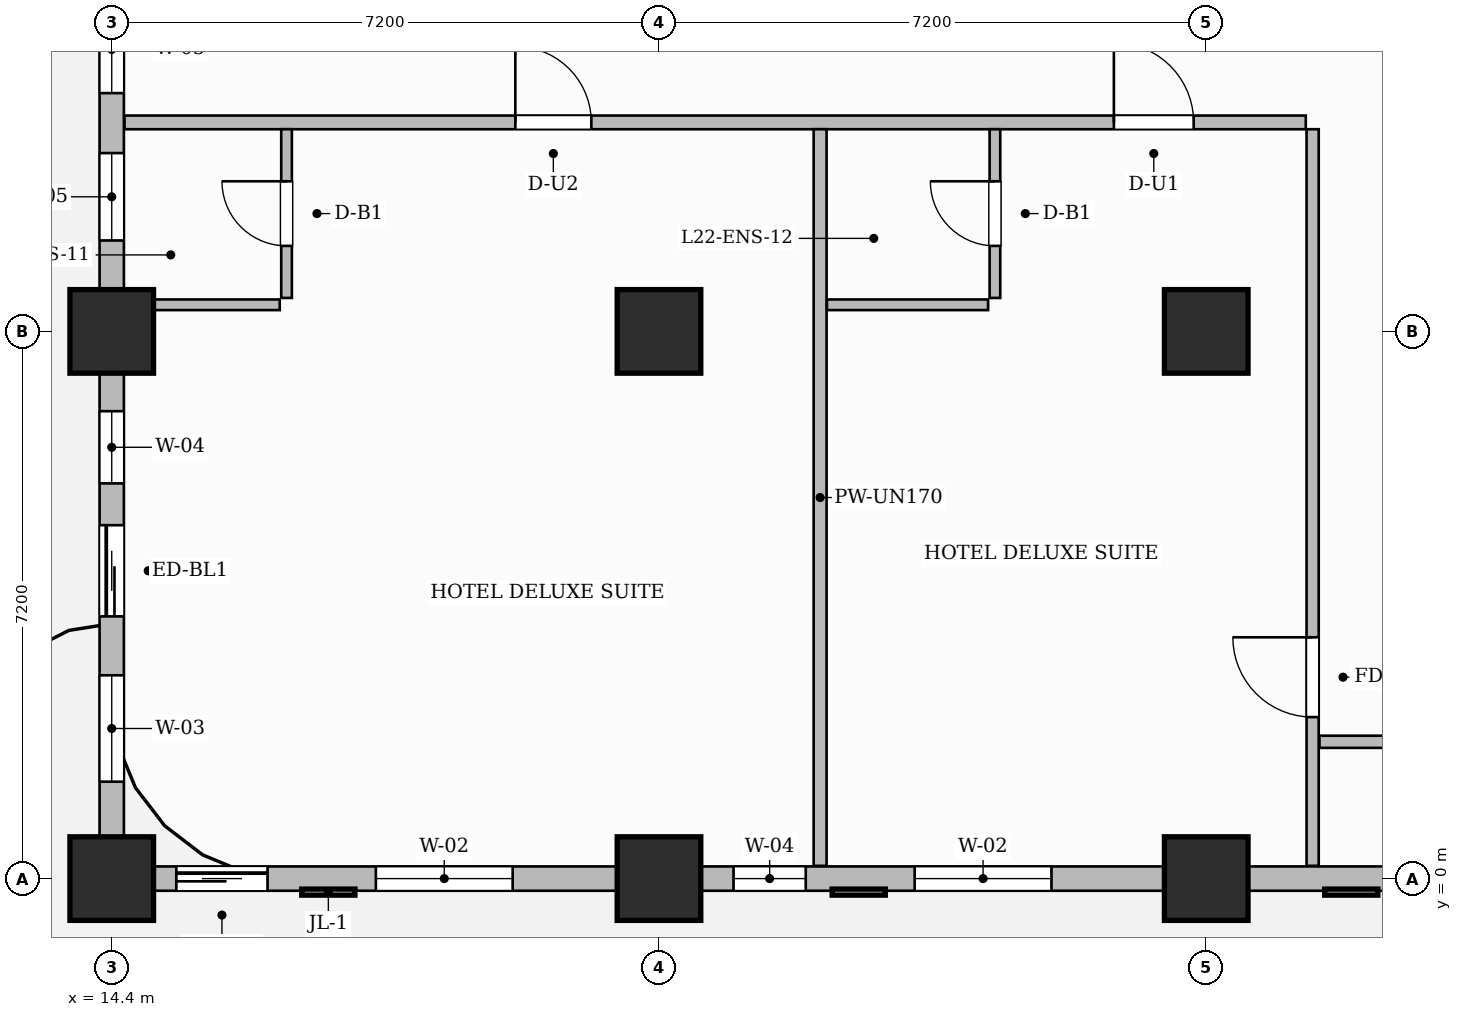
"""IFC4 building model, lengths in metres.
Left out: names, types, materials, properties, quantities, classifications, styles, units other than length and angle.
Written with IfcOpenShell. Run it as: python <this file> out.ifc"""

import sys

from ifc_helpers import new_model, si_unit, direction, frame, frame_2d, origin, origin_2d, place, context, subcontext, project, spatial, rectangle, extrude, source, transform, mapped, element, fill, save


model = new_model("IFC4")
c1 = context("Model", 3, precision=1e-05, world=origin(), true_north=direction((0.0, 1.0)))
c2 = subcontext(c1, "Body", "Model", "MODEL_VIEW")
j1 = project(units=[si_unit("LENGTHUNIT", "METRE"), si_unit("PLANEANGLEUNIT", "RADIAN")], contexts=[c1])
p1 = place(None, origin())
s1 = spatial("IfcSite", under=j1, at=p1, CompositionType="ELEMENT")
p2 = place(p1, origin())
s2 = spatial("IfcBuilding", under=s1, at=p2, CompositionType="ELEMENT")
p3 = place(p2, frame((0.0, 0.0, 91.6)))
s3 = spatial("IfcBuildingStorey", under=s2, at=p3, CompositionType="ELEMENT", Elevation=91.6)
m1 = source(origin(), c2, "Body", "SweptSolid", [
    extrude(rectangle(XDim=1.1, YDim=1.1, at=origin_2d()), origin(), (0.0, 0.0, 1.0), 3.7),
])
for number, where, z_axis, x_axis in (
    (1, (14.4, 0.0, 0.0), (0.0, 0.0, 1.0), (1.0, 0.0, 0.0)),
    (2, (14.4, 7.2, 0.0), (0.0, 0.0, 1.0), (1.0, 0.0, 0.0)),
    (3, (21.6, 0.0, 0.0), (0.0, 0.0, 1.0), (1.0, 0.0, 0.0)),
    (4, (21.6, 7.2, 0.0), (0.0, 0.0, 1.0), (1.0, 0.0, 0.0)),
    (5, (28.8, 0.0, 0.0), (0.0, 0.0, 1.0), (1.0, 0.0, 0.0)),
    (6, (28.8, 7.2, 0.0), (0.0, 0.0, 1.0), (1.0, 0.0, 0.0)),
):
    element("IfcColumn", number, at=place(p3, frame(where, z_axis=z_axis, x_axis=x_axis)), inside=s3, PredefinedType="COLUMN", context=c2, shape_type="MappedRepresentation", body=[
        mapped(m1, transform((0.0, 0.0, 0.0), scale=1.0)),
    ])
p4 = place(p3, frame((14.568, 9.95, 0.0), z_axis=(0.0, 0.0, 1.0), x_axis=(1.0, 0.0, 0.0)))
e7 = element("IfcWall", 7, at=p4, inside=s3, PredefinedType="PARTITIONING", context=c2, shape_type="SweptSolid", body=[
    extrude(rectangle(XDim=15.542, YDim=0.18, at=frame_2d((7.771, 0.0))), origin(), (0.0, 0.0, 1.0), 3.45),
])
p5 = place(p4, frame((5.142, 0.0, 0.0)))
e8 = element("IfcOpeningElement", 8, at=p5, cuts=e7, PredefinedType="OPENING", context=c2, shape_type="SweptSolid", body=[
    extrude(rectangle(XDim=1.0, YDim=2.2, at=frame_2d((0.5, 1.1))), frame((0.0, 0.1, 0.0), z_axis=(0.0, -1.0, 0.0), x_axis=(1.0, 0.0, 0.0)), (0.0, 0.0, 1.0), 0.2),
])
p6 = place(p4, frame((13.017, 0.0, 0.0)))
e9 = element("IfcOpeningElement", 9, at=p6, cuts=e7, PredefinedType="OPENING", context=c2, shape_type="SweptSolid", body=[
    extrude(rectangle(XDim=1.05, YDim=2.25, at=frame_2d((0.525, 1.125))), frame((0.0, 0.1, 0.0), z_axis=(0.0, -1.0, 0.0), x_axis=(1.0, 0.0, 0.0)), (0.0, 0.0, 1.0), 0.2),
])
p7 = place(p3, frame((30.2, 0.168, 0.0), z_axis=(0.0, 0.0, 1.0), x_axis=(0.0, 1.0, 0.0)))
e10 = element("IfcWall", 10, at=p7, inside=s3, PredefinedType="PARTITIONING", context=c2, shape_type="SweptSolid", body=[
    extrude(rectangle(XDim=9.692, YDim=0.16, at=frame_2d((4.846, 0.0))), origin(), (0.0, 0.0, 1.0), 3.45),
])
p8 = place(p7, frame((1.957, 0.0, 0.0)))
e11 = element("IfcOpeningElement", 11, at=p8, cuts=e10, PredefinedType="OPENING", context=c2, shape_type="SweptSolid", body=[
    extrude(rectangle(XDim=1.05, YDim=2.15, at=frame_2d((0.525, 1.075))), frame((0.0, 0.09, 0.0), z_axis=(0.0, -1.0, 0.0), x_axis=(1.0, 0.0, 0.0)), (0.0, 0.0, 1.0), 0.18),
])
p9 = place(p3, frame((30.29, 1.8, 0.0), z_axis=(0.0, 0.0, 1.0), x_axis=(1.0, 0.0, 0.0)))
e12 = element("IfcWall", 12, at=p9, inside=s3, PredefinedType="PARTITIONING", context=c2, shape_type="SweptSolid", body=[
    extrude(rectangle(XDim=19.37, YDim=0.16, at=frame_2d((9.685, 0.0))), origin(), (0.0, 0.0, 1.0), 3.45),
])
p10 = place(p9, frame((9.735, 0.0, 0.0)))
e13 = element("IfcOpeningElement", 13, at=p10, cuts=e12, PredefinedType="OPENING", context=c2, shape_type="SweptSolid", body=[
    extrude(rectangle(XDim=0.95, YDim=2.15, at=frame_2d((0.475, 1.075))), frame((0.0, 0.09, 0.0), z_axis=(0.0, -1.0, 0.0), x_axis=(1.0, 0.0, 0.0)), (0.0, 0.0, 1.0), 0.18),
])
p11 = place(p3, frame((23.72, 0.168, 0.0), z_axis=(0.0, 0.0, 1.0), x_axis=(0.0, 1.0, 0.0)))
e14 = element("IfcWall", 14, at=p11, inside=s3, PredefinedType="PARTITIONING", context=c2, shape_type="SweptSolid", body=[
    extrude(rectangle(XDim=9.692, YDim=0.17, at=frame_2d((4.846, 0.0))), origin(), (0.0, 0.0, 1.0), 3.45),
])
p12 = place(p3, frame((16.7, 7.64, 0.0), z_axis=(0.0, 0.0, 1.0), x_axis=(0.0, 1.0, 0.0)))
e15 = element("IfcWall", 15, at=p12, inside=s3, PredefinedType="PARTITIONING", context=c2, shape_type="SweptSolid", body=[
    extrude(rectangle(XDim=2.22, YDim=0.14, at=frame_2d((1.11, 0.0))), origin(), (0.0, 0.0, 1.0), 3.45),
])
p13 = place(p12, frame((0.685, 0.0, 0.0)))
e16 = element("IfcOpeningElement", 16, at=p13, cuts=e15, PredefinedType="OPENING", context=c2, shape_type="SweptSolid", body=[
    extrude(rectangle(XDim=0.85, YDim=2.1, at=frame_2d((0.425, 1.05))), frame((0.0, 0.08, 0.0), z_axis=(0.0, -1.0, 0.0), x_axis=(1.0, 0.0, 0.0)), (0.0, 0.0, 1.0), 0.16),
])
p14 = place(p3, frame((14.49, 7.55, 0.0), z_axis=(0.0, 0.0, 1.0), x_axis=(1.0, 0.0, 0.0)))
e17 = element("IfcWall", 17, at=p14, inside=s3, PredefinedType="PARTITIONING", context=c2, shape_type="SweptSolid", body=[
    extrude(rectangle(XDim=2.12, YDim=0.14, at=frame_2d((1.06, 0.0))), origin(), (0.0, 0.0, 1.0), 3.45),
])
p15 = place(p3, frame((26.02, 7.64, 0.0), z_axis=(0.0, 0.0, 1.0), x_axis=(0.0, 1.0, 0.0)))
e18 = element("IfcWall", 18, at=p15, inside=s3, PredefinedType="PARTITIONING", context=c2, shape_type="SweptSolid", body=[
    extrude(rectangle(XDim=2.22, YDim=0.14, at=frame_2d((1.11, 0.0))), origin(), (0.0, 0.0, 1.0), 3.45),
])
p16 = place(p15, frame((0.685, 0.0, 0.0)))
e19 = element("IfcOpeningElement", 19, at=p16, cuts=e18, PredefinedType="OPENING", context=c2, shape_type="SweptSolid", body=[
    extrude(rectangle(XDim=0.85, YDim=2.1, at=frame_2d((0.425, 1.05))), frame((0.0, 0.08, 0.0), z_axis=(0.0, -1.0, 0.0), x_axis=(1.0, 0.0, 0.0)), (0.0, 0.0, 1.0), 0.16),
])
p17 = place(p3, frame((23.81, 7.55, 0.0), z_axis=(0.0, 0.0, 1.0), x_axis=(1.0, 0.0, 0.0)))
e20 = element("IfcWall", 20, at=p17, inside=s3, PredefinedType="PARTITIONING", context=c2, shape_type="SweptSolid", body=[
    extrude(rectangle(XDim=2.12, YDim=0.14, at=frame_2d((1.06, 0.0))), origin(), (0.0, 0.0, 1.0), 3.45),
])
p18 = place(p3, frame((14.4, 0.0, 0.0), z_axis=(0.0, 0.0, 1.0), x_axis=(1.0, 0.0, 0.0)))
e21 = element("IfcWall", 21, at=p18, inside=s3, PredefinedType="SOLIDWALL", context=c2, shape_type="SweptSolid", body=[
    extrude(rectangle(XDim=43.2, YDim=0.32, at=frame_2d((21.6, 0.0))), origin(), (0.0, 0.0, 1.0), 2.885),
])
p19 = place(p18, frame((0.85, 0.0, 0.0)))
e22 = element("IfcOpeningElement", 22, at=p19, cuts=e21, PredefinedType="OPENING", context=c2, shape_type="SweptSolid", body=[
    extrude(rectangle(XDim=1.2, YDim=2.2, at=frame_2d((0.6, 1.1))), frame((0.0, 0.17, 0.0), z_axis=(0.0, -1.0, 0.0), x_axis=(1.0, 0.0, 0.0)), (0.0, 0.0, 1.0), 0.34),
])
p20 = place(p18, frame((3.475, 0.0, 0.8)))
e23 = element("IfcOpeningElement", 23, at=p20, cuts=e21, PredefinedType="OPENING", context=c2, shape_type="SweptSolid", body=[
    extrude(rectangle(XDim=1.8, YDim=1.85, at=frame_2d((0.9, 0.925))), frame((0.0, 0.17, 0.0), z_axis=(0.0, -1.0, 0.0), x_axis=(1.0, 0.0, 0.0)), (0.0, 0.0, 1.0), 0.34),
])
p21 = place(p18, frame((8.181, 0.0, 0.8)))
e24 = element("IfcOpeningElement", 24, at=p21, cuts=e21, PredefinedType="OPENING", context=c2, shape_type="SweptSolid", body=[
    extrude(rectangle(XDim=0.95, YDim=1.75, at=frame_2d((0.475, 0.875))), frame((0.0, 0.17, 0.0), z_axis=(0.0, -1.0, 0.0), x_axis=(1.0, 0.0, 0.0)), (0.0, 0.0, 1.0), 0.34),
])
p22 = place(p18, frame((10.564, 0.0, 0.8)))
e25 = element("IfcOpeningElement", 25, at=p22, cuts=e21, PredefinedType="OPENING", context=c2, shape_type="SweptSolid", body=[
    extrude(rectangle(XDim=1.8, YDim=1.85, at=frame_2d((0.9, 0.925))), frame((0.0, 0.17, 0.0), z_axis=(0.0, -1.0, 0.0), x_axis=(1.0, 0.0, 0.0)), (0.0, 0.0, 1.0), 0.34),
])
p23 = place(p18, frame((16.804, 0.0, 0.8)))
e26 = element("IfcOpeningElement", 26, at=p23, cuts=e21, PredefinedType="OPENING", context=c2, shape_type="SweptSolid", body=[
    extrude(rectangle(XDim=1.8, YDim=1.85, at=frame_2d((0.9, 0.925))), frame((0.0, 0.17, 0.0), z_axis=(0.0, -1.0, 0.0), x_axis=(1.0, 0.0, 0.0)), (0.0, 0.0, 1.0), 0.34),
])
p24 = place(p18, frame((21.725, 0.0, 0.8)))
e27 = element("IfcOpeningElement", 27, at=p24, cuts=e21, PredefinedType="OPENING", context=c2, shape_type="SweptSolid", body=[
    extrude(rectangle(XDim=1.8, YDim=1.85, at=frame_2d((0.9, 0.925))), frame((0.0, 0.17, 0.0), z_axis=(0.0, -1.0, 0.0), x_axis=(1.0, 0.0, 0.0)), (0.0, 0.0, 1.0), 0.34),
])
p25 = place(p18, frame((24.475, 0.0, 0.8)))
e28 = element("IfcOpeningElement", 28, at=p25, cuts=e21, PredefinedType="OPENING", context=c2, shape_type="SweptSolid", body=[
    extrude(rectangle(XDim=1.8, YDim=1.85, at=frame_2d((0.9, 0.925))), frame((0.0, 0.17, 0.0), z_axis=(0.0, -1.0, 0.0), x_axis=(1.0, 0.0, 0.0)), (0.0, 0.0, 1.0), 0.34),
])
p26 = place(p18, frame((29.075, 0.0, 0.8)))
e29 = element("IfcOpeningElement", 29, at=p26, cuts=e21, PredefinedType="OPENING", context=c2, shape_type="SweptSolid", body=[
    extrude(rectangle(XDim=1.8, YDim=1.85, at=frame_2d((0.9, 0.925))), frame((0.0, 0.17, 0.0), z_axis=(0.0, -1.0, 0.0), x_axis=(1.0, 0.0, 0.0)), (0.0, 0.0, 1.0), 0.34),
])
p27 = place(p18, frame((32.125, 0.0, 0.8)))
e30 = element("IfcOpeningElement", 30, at=p27, cuts=e21, PredefinedType="OPENING", context=c2, shape_type="SweptSolid", body=[
    extrude(rectangle(XDim=1.8, YDim=1.85, at=frame_2d((0.9, 0.925))), frame((0.0, 0.17, 0.0), z_axis=(0.0, -1.0, 0.0), x_axis=(1.0, 0.0, 0.0)), (0.0, 0.0, 1.0), 0.34),
])
p28 = place(p18, frame((36.875, 0.0, 0.8)))
e31 = element("IfcOpeningElement", 31, at=p28, cuts=e21, PredefinedType="OPENING", context=c2, shape_type="SweptSolid", body=[
    extrude(rectangle(XDim=1.8, YDim=1.85, at=frame_2d((0.9, 0.925))), frame((0.0, 0.17, 0.0), z_axis=(0.0, -1.0, 0.0), x_axis=(1.0, 0.0, 0.0)), (0.0, 0.0, 1.0), 0.34),
])
p29 = place(p18, frame((39.925, 0.0, 0.8)))
e32 = element("IfcOpeningElement", 32, at=p29, cuts=e21, PredefinedType="OPENING", context=c2, shape_type="SweptSolid", body=[
    extrude(rectangle(XDim=1.8, YDim=1.85, at=frame_2d((0.9, 0.925))), frame((0.0, 0.17, 0.0), z_axis=(0.0, -1.0, 0.0), x_axis=(1.0, 0.0, 0.0)), (0.0, 0.0, 1.0), 0.34),
])
p30 = place(p3, frame((14.4, 0.05, 0.0), z_axis=(0.0, 0.0, 1.0), x_axis=(0.0, 1.0, 0.0)))
e33 = element("IfcWall", 33, at=p30, inside=s3, PredefinedType="SOLIDWALL", context=c2, shape_type="SweptSolid", body=[
    extrude(rectangle(XDim=20.6, YDim=0.32, at=frame_2d((10.3, 0.0))), origin(), (0.0, 0.0, 1.0), 2.885),
])
p31 = place(p30, frame((3.4, 0.0, 0.0)))
e34 = element("IfcOpeningElement", 34, at=p31, cuts=e33, PredefinedType="OPENING", context=c2, shape_type="SweptSolid", body=[
    extrude(rectangle(XDim=1.2, YDim=2.2, at=frame_2d((0.6, 1.1))), frame((0.0, 0.17, 0.0), z_axis=(0.0, -1.0, 0.0), x_axis=(1.0, 0.0, 0.0)), (0.0, 0.0, 1.0), 0.34),
])
p32 = place(p30, frame((1.225, 0.0, 0.8)))
e35 = element("IfcOpeningElement", 35, at=p32, cuts=e33, PredefinedType="OPENING", context=c2, shape_type="SweptSolid", body=[
    extrude(rectangle(XDim=1.4, YDim=1.85, at=frame_2d((0.7, 0.925))), frame((0.0, 0.17, 0.0), z_axis=(0.0, -1.0, 0.0), x_axis=(1.0, 0.0, 0.0)), (0.0, 0.0, 1.0), 0.34),
])
p33 = place(p30, frame((5.15, 0.0, 0.8)))
e36 = element("IfcOpeningElement", 36, at=p33, cuts=e33, PredefinedType="OPENING", context=c2, shape_type="SweptSolid", body=[
    extrude(rectangle(XDim=0.95, YDim=1.75, at=frame_2d((0.475, 0.875))), frame((0.0, 0.17, 0.0), z_axis=(0.0, -1.0, 0.0), x_axis=(1.0, 0.0, 0.0)), (0.0, 0.0, 1.0), 0.34),
])
p34 = place(p30, frame((8.346, 0.0, 0.8)))
e37 = element("IfcOpeningElement", 37, at=p34, cuts=e33, PredefinedType="OPENING", context=c2, shape_type="SweptSolid", body=[
    extrude(rectangle(XDim=1.15, YDim=1.8, at=frame_2d((0.575, 0.9))), frame((0.0, 0.17, 0.0), z_axis=(0.0, -1.0, 0.0), x_axis=(1.0, 0.0, 0.0)), (0.0, 0.0, 1.0), 0.34),
])
p35 = place(p30, frame((10.285, 0.0, 0.8)))
e38 = element("IfcOpeningElement", 38, at=p35, cuts=e33, PredefinedType="OPENING", context=c2, shape_type="SweptSolid", body=[
    extrude(rectangle(XDim=1.15, YDim=1.8, at=frame_2d((0.575, 0.9))), frame((0.0, 0.17, 0.0), z_axis=(0.0, -1.0, 0.0), x_axis=(1.0, 0.0, 0.0)), (0.0, 0.0, 1.0), 0.34),
])
p36 = place(p30, frame((12.114, 0.0, 0.8)))
e39 = element("IfcOpeningElement", 39, at=p36, cuts=e33, PredefinedType="OPENING", context=c2, shape_type="SweptSolid", body=[
    extrude(rectangle(XDim=1.15, YDim=1.8, at=frame_2d((0.575, 0.9))), frame((0.0, 0.17, 0.0), z_axis=(0.0, -1.0, 0.0), x_axis=(1.0, 0.0, 0.0)), (0.0, 0.0, 1.0), 0.34),
])
p37 = place(p30, frame((16.79, 0.0, 0.8)))
e40 = element("IfcOpeningElement", 40, at=p37, cuts=e33, PredefinedType="OPENING", context=c2, shape_type="SweptSolid", body=[
    extrude(rectangle(XDim=1.8, YDim=1.85, at=frame_2d((0.9, 0.925))), frame((0.0, 0.17, 0.0), z_axis=(0.0, -1.0, 0.0), x_axis=(1.0, 0.0, 0.0)), (0.0, 0.0, 1.0), 0.34),
])
m2 = source(origin(), c2, "Body", "SweptSolid", [
    extrude(rectangle(XDim=1.05, YDim=2.15, at=frame_2d((0.525, 1.075))), frame((0.0, 0.025, 0.0), z_axis=(0.0, -1.0, 0.0), x_axis=(1.0, 0.0, 0.0)), (0.0, 0.0, 1.0), 0.05),
])
p38 = place(p8, origin())
e41 = element("IfcDoor", 41, at=p38, inside=s3, OperationType="SINGLE_SWING_RIGHT", PredefinedType="DOOR", context=c2, shape_type="MappedRepresentation", body=[
    mapped(m2, transform((0.0, 0.0, 0.0), scale=1.0)),
])
fill(e11, e41)
m3 = source(origin(), c2, "Body", "SweptSolid", [
    extrude(rectangle(XDim=0.85, YDim=2.1, at=frame_2d((0.425, 1.05))), frame((0.0, 0.025, 0.0), z_axis=(0.0, -1.0, 0.0), x_axis=(1.0, 0.0, 0.0)), (0.0, 0.0, 1.0), 0.05),
])
p39 = place(p13, origin())
e42 = element("IfcDoor", 42, at=p39, inside=s3, OperationType="SINGLE_SWING_RIGHT", PredefinedType="DOOR", context=c2, shape_type="MappedRepresentation", body=[
    mapped(m3, transform((0.0, 0.0, 0.0), scale=1.0)),
])
fill(e16, e42)
m4 = source(origin(), c2, "Body", "SweptSolid", [
    extrude(rectangle(XDim=1.0, YDim=2.2, at=frame_2d((0.5, 1.1))), frame((0.0, 0.025, 0.0), z_axis=(0.0, -1.0, 0.0), x_axis=(1.0, 0.0, 0.0)), (0.0, 0.0, 1.0), 0.05),
])
p40 = place(p5, origin())
e43 = element("IfcDoor", 43, at=p40, inside=s3, OperationType="SINGLE_SWING_LEFT", PredefinedType="DOOR", context=c2, shape_type="MappedRepresentation", body=[
    mapped(m4, transform((0.0, 0.0, 0.0), scale=1.0)),
])
fill(e8, e43)
p41 = place(p16, origin())
e44 = element("IfcDoor", 44, at=p41, inside=s3, OperationType="SINGLE_SWING_RIGHT", PredefinedType="DOOR", context=c2, shape_type="MappedRepresentation", body=[
    mapped(m3, transform((0.0, 0.0, 0.0), scale=1.0)),
])
fill(e19, e44)
m5 = source(origin(), c2, "Body", "SweptSolid", [
    extrude(rectangle(XDim=1.05, YDim=2.25, at=frame_2d((0.525, 1.125))), frame((0.0, 0.025, 0.0), z_axis=(0.0, -1.0, 0.0), x_axis=(1.0, 0.0, 0.0)), (0.0, 0.0, 1.0), 0.05),
])
p42 = place(p6, origin())
e45 = element("IfcDoor", 45, at=p42, inside=s3, OperationType="SINGLE_SWING_LEFT", PredefinedType="DOOR", context=c2, shape_type="MappedRepresentation", body=[
    mapped(m5, transform((0.0, 0.0, 0.0), scale=1.0)),
])
fill(e9, e45)
m6 = source(origin(), c2, "Body", "SweptSolid", [
    extrude(rectangle(XDim=1.2, YDim=2.2, at=frame_2d((0.6, 1.1))), frame((0.0, 0.025, 0.0), z_axis=(0.0, -1.0, 0.0), x_axis=(1.0, 0.0, 0.0)), (0.0, 0.0, 1.0), 0.05),
])
p43 = place(p19, origin())
e46 = element("IfcDoor", 46, at=p43, inside=s3, OperationType="SLIDING_TO_LEFT", PredefinedType="DOOR", context=c2, shape_type="MappedRepresentation", body=[
    mapped(m6, transform((0.0, 0.0, 0.0), scale=1.0)),
])
fill(e22, e46)
p44 = place(p31, origin())
e47 = element("IfcDoor", 47, at=p44, inside=s3, OperationType="SLIDING_TO_LEFT", PredefinedType="DOOR", context=c2, shape_type="MappedRepresentation", body=[
    mapped(m6, transform((0.0, 0.0, 0.0), scale=1.0)),
])
fill(e34, e47)
m7 = source(origin(), c2, "Body", "SweptSolid", [
    extrude(rectangle(XDim=1.8, YDim=1.85, at=frame_2d((0.9, 0.925))), frame((0.0, 0.03, 0.0), z_axis=(0.0, -1.0, 0.0), x_axis=(1.0, 0.0, 0.0)), (0.0, 0.0, 1.0), 0.06),
])
p45 = place(p20, origin())
e48 = element("IfcWindow", 48, at=p45, inside=s3, PartitioningType="DOUBLE_PANEL_VERTICAL", PredefinedType="WINDOW", context=c2, shape_type="MappedRepresentation", body=[
    mapped(m7, transform((0.0, 0.0, 0.0), scale=1.0)),
])
fill(e23, e48)
m8 = source(origin(), c2, "Body", "SweptSolid", [
    extrude(rectangle(XDim=0.95, YDim=1.75, at=frame_2d((0.475, 0.875))), frame((0.0, 0.03, 0.0), z_axis=(0.0, -1.0, 0.0), x_axis=(1.0, 0.0, 0.0)), (0.0, 0.0, 1.0), 0.06),
])
p46 = place(p21, origin())
e49 = element("IfcWindow", 49, at=p46, inside=s3, PartitioningType="SINGLE_PANEL", PredefinedType="WINDOW", context=c2, shape_type="MappedRepresentation", body=[
    mapped(m8, transform((0.0, 0.0, 0.0), scale=1.0)),
])
fill(e24, e49)
p47 = place(p22, origin())
e50 = element("IfcWindow", 50, at=p47, inside=s3, PartitioningType="DOUBLE_PANEL_VERTICAL", PredefinedType="WINDOW", context=c2, shape_type="MappedRepresentation", body=[
    mapped(m7, transform((0.0, 0.0, 0.0), scale=1.0)),
])
fill(e25, e50)
m9 = source(origin(), c2, "Body", "SweptSolid", [
    extrude(rectangle(XDim=1.4, YDim=1.85, at=frame_2d((0.7, 0.925))), frame((0.0, 0.03, 0.0), z_axis=(0.0, -1.0, 0.0), x_axis=(1.0, 0.0, 0.0)), (0.0, 0.0, 1.0), 0.06),
])
p48 = place(p32, origin())
e51 = element("IfcWindow", 51, at=p48, inside=s3, PartitioningType="SINGLE_PANEL", PredefinedType="WINDOW", context=c2, shape_type="MappedRepresentation", body=[
    mapped(m9, transform((0.0, 0.0, 0.0), scale=1.0)),
])
fill(e35, e51)
p49 = place(p33, origin())
e52 = element("IfcWindow", 52, at=p49, inside=s3, PartitioningType="SINGLE_PANEL", PredefinedType="WINDOW", context=c2, shape_type="MappedRepresentation", body=[
    mapped(m8, transform((0.0, 0.0, 0.0), scale=1.0)),
])
fill(e36, e52)
m10 = source(origin(), c2, "Body", "SweptSolid", [
    extrude(rectangle(XDim=1.15, YDim=1.8, at=frame_2d((0.575, 0.9))), frame((0.0, 0.03, 0.0), z_axis=(0.0, -1.0, 0.0), x_axis=(1.0, 0.0, 0.0)), (0.0, 0.0, 1.0), 0.06),
])
p50 = place(p34, origin())
e53 = element("IfcWindow", 53, at=p50, inside=s3, PartitioningType="SINGLE_PANEL", PredefinedType="WINDOW", context=c2, shape_type="MappedRepresentation", body=[
    mapped(m10, transform((0.0, 0.0, 0.0), scale=1.0)),
])
fill(e37, e53)
p51 = place(p35, origin())
e54 = element("IfcWindow", 54, at=p51, inside=s3, PartitioningType="SINGLE_PANEL", PredefinedType="WINDOW", context=c2, shape_type="MappedRepresentation", body=[
    mapped(m10, transform((0.0, 0.0, 0.0), scale=1.0)),
])
fill(e38, e54)
save(model, sys.argv[1])
